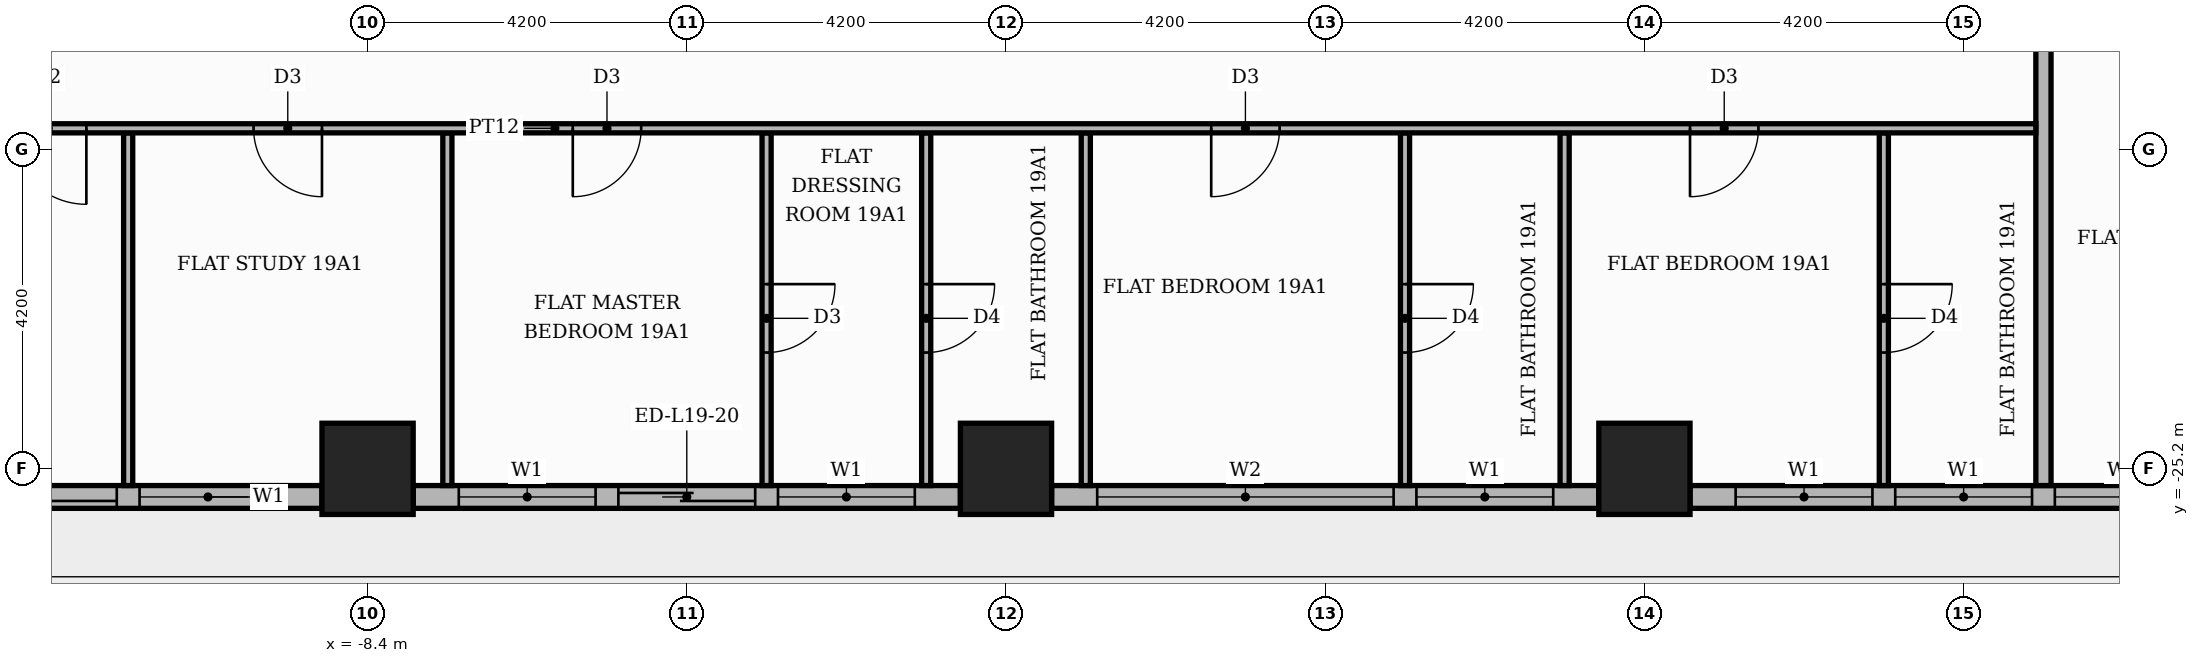
"""IFC4 building model, lengths in metres.
Left out: names, types, materials, properties, quantities, classifications, styles, units other than length and angle.
Written with IfcOpenShell. Run it as: python <this file> out.ifc"""

import sys

from ifc_helpers import new_model, si_unit, direction, frame, frame_2d, origin, origin_2d, place, context, subcontext, project, spatial, rectangle, extrude, element, fill, save


model = new_model("IFC4")
c1 = context("Model", 3, precision=1e-05, world=origin(), true_north=direction((0.0, 1.0)))
c2 = subcontext(c1, "Body", "Model", "MODEL_VIEW")
j1 = project(units=[si_unit("LENGTHUNIT", "METRE"), si_unit("PLANEANGLEUNIT", "RADIAN")], contexts=[c1])
p1 = place(None, origin())
s1 = spatial("IfcSite", under=j1, at=p1, CompositionType="ELEMENT")
p2 = place(p1, origin())
s2 = spatial("IfcBuilding", under=s1, at=p2, CompositionType="ELEMENT")
p3 = place(p2, frame((0.0, 0.0, 83.1)))
s3 = spatial("IfcBuildingStorey", under=s2, at=p3, CompositionType="ELEMENT", Elevation=83.1)
for number, where, z_axis, x_axis in (
    (1, (0.0, -25.2, 0.0), (0.0, 0.0, 1.0), (1.0, 0.0, 0.0)),
    (2, (8.4, -25.2, 0.0), (0.0, 0.0, 1.0), (1.0, 0.0, 0.0)),
    (3, (-8.4, -25.2, 0.0), (0.0, 0.0, 1.0), (1.0, 0.0, 0.0)),
):
    element("IfcColumn", number, at=place(p3, frame(where, z_axis=z_axis, x_axis=x_axis)), inside=s3, PredefinedType="COLUMN", context=c2, shape_type="SweptSolid", body=[
        extrude(rectangle(XDim=1.2, YDim=1.2, at=origin_2d()), origin(), (0.0, 0.0, 1.0), 3.9),
    ])
p4 = place(p3, frame((-16.2, -25.57, 0.0), z_axis=(0.0, 0.0, 1.0), x_axis=(1.0, 0.0, 0.0)))
e4 = element("IfcWall", 4, at=p4, inside=s3, PredefinedType="STANDARD", context=c2, shape_type="SweptSolid", body=[
    extrude(rectangle(XDim=7.2, YDim=0.3, at=frame_2d((3.6, 0.0))), origin(), (0.0, 0.0, 1.0), 3.48),
])
p5 = place(p4, frame((0.6, 0.0, 0.0)))
e5 = element("IfcOpeningElement", 5, at=p5, cuts=e4, PredefinedType="OPENING", context=c2, shape_type="SweptSolid", body=[
    extrude(rectangle(XDim=3.9, YDim=2.4, at=frame_2d((1.95, 1.2))), frame((0.0, 0.16, 0.0), z_axis=(0.0, -1.0, 0.0), x_axis=(1.0, 0.0, 0.0)), (0.0, 0.0, 1.0), 0.32),
])
p6 = place(p4, frame((4.8, 0.0, 0.9)))
e6 = element("IfcOpeningElement", 6, at=p6, cuts=e4, PredefinedType="OPENING", context=c2, shape_type="SweptSolid", body=[
    extrude(rectangle(XDim=1.8, YDim=2.1, at=frame_2d((0.9, 1.05))), frame((0.0, 0.16, 0.0), z_axis=(0.0, -1.0, 0.0), x_axis=(1.0, 0.0, 0.0)), (0.0, 0.0, 1.0), 0.32),
])
p7 = place(p3, frame((-7.8, -25.57, 0.0), z_axis=(0.0, 0.0, 1.0), x_axis=(1.0, 0.0, 0.0)))
e7 = element("IfcWall", 7, at=p7, inside=s3, PredefinedType="STANDARD", context=c2, shape_type="SweptSolid", body=[
    extrude(rectangle(XDim=7.2, YDim=0.3, at=frame_2d((3.6, 0.0))), origin(), (0.0, 0.0, 1.0), 3.48),
])
p8 = place(p7, frame((0.6, 0.0, 0.9)))
e8 = element("IfcOpeningElement", 8, at=p8, cuts=e7, PredefinedType="OPENING", context=c2, shape_type="SweptSolid", body=[
    extrude(rectangle(XDim=1.8, YDim=2.1, at=frame_2d((0.9, 1.05))), frame((0.0, 0.16, 0.0), z_axis=(0.0, -1.0, 0.0), x_axis=(1.0, 0.0, 0.0)), (0.0, 0.0, 1.0), 0.32),
])
p9 = place(p7, frame((2.7, 0.0, 0.0)))
e9 = element("IfcOpeningElement", 9, at=p9, cuts=e7, PredefinedType="OPENING", context=c2, shape_type="SweptSolid", body=[
    extrude(rectangle(XDim=1.8, YDim=2.4, at=frame_2d((0.9, 1.2))), frame((0.0, 0.16, 0.0), z_axis=(0.0, -1.0, 0.0), x_axis=(1.0, 0.0, 0.0)), (0.0, 0.0, 1.0), 0.32),
])
p10 = place(p7, frame((4.8, 0.0, 0.9)))
e10 = element("IfcOpeningElement", 10, at=p10, cuts=e7, PredefinedType="OPENING", context=c2, shape_type="SweptSolid", body=[
    extrude(rectangle(XDim=1.8, YDim=2.1, at=frame_2d((0.9, 1.05))), frame((0.0, 0.16, 0.0), z_axis=(0.0, -1.0, 0.0), x_axis=(1.0, 0.0, 0.0)), (0.0, 0.0, 1.0), 0.32),
])
p11 = place(p3, frame((0.6, -25.57, 0.0), z_axis=(0.0, 0.0, 1.0), x_axis=(1.0, 0.0, 0.0)))
e11 = element("IfcWall", 11, at=p11, inside=s3, PredefinedType="STANDARD", context=c2, shape_type="SweptSolid", body=[
    extrude(rectangle(XDim=7.2, YDim=0.3, at=frame_2d((3.6, 0.0))), origin(), (0.0, 0.0, 1.0), 3.48),
])
p12 = place(p11, frame((0.6, 0.0, 0.9)))
e12 = element("IfcOpeningElement", 12, at=p12, cuts=e11, PredefinedType="OPENING", context=c2, shape_type="SweptSolid", body=[
    extrude(rectangle(XDim=3.9, YDim=2.1, at=frame_2d((1.95, 1.05))), frame((0.0, 0.16, 0.0), z_axis=(0.0, -1.0, 0.0), x_axis=(1.0, 0.0, 0.0)), (0.0, 0.0, 1.0), 0.32),
])
p13 = place(p11, frame((4.8, 0.0, 0.9)))
e13 = element("IfcOpeningElement", 13, at=p13, cuts=e11, PredefinedType="OPENING", context=c2, shape_type="SweptSolid", body=[
    extrude(rectangle(XDim=1.8, YDim=2.1, at=frame_2d((0.9, 1.05))), frame((0.0, 0.16, 0.0), z_axis=(0.0, -1.0, 0.0), x_axis=(1.0, 0.0, 0.0)), (0.0, 0.0, 1.0), 0.32),
])
p14 = place(p3, frame((9.0, -25.57, 0.0), z_axis=(0.0, 0.0, 1.0), x_axis=(1.0, 0.0, 0.0)))
e14 = element("IfcWall", 14, at=p14, inside=s3, PredefinedType="STANDARD", context=c2, shape_type="SweptSolid", body=[
    extrude(rectangle(XDim=7.2, YDim=0.3, at=frame_2d((3.6, 0.0))), origin(), (0.0, 0.0, 1.0), 3.48),
])
p15 = place(p14, frame((0.6, 0.0, 0.9)))
e15 = element("IfcOpeningElement", 15, at=p15, cuts=e14, PredefinedType="OPENING", context=c2, shape_type="SweptSolid", body=[
    extrude(rectangle(XDim=1.8, YDim=2.1, at=frame_2d((0.9, 1.05))), frame((0.0, 0.16, 0.0), z_axis=(0.0, -1.0, 0.0), x_axis=(1.0, 0.0, 0.0)), (0.0, 0.0, 1.0), 0.32),
])
p16 = place(p14, frame((2.7, 0.0, 0.9)))
e16 = element("IfcOpeningElement", 16, at=p16, cuts=e14, PredefinedType="OPENING", context=c2, shape_type="SweptSolid", body=[
    extrude(rectangle(XDim=1.8, YDim=2.1, at=frame_2d((0.9, 1.05))), frame((0.0, 0.16, 0.0), z_axis=(0.0, -1.0, 0.0), x_axis=(1.0, 0.0, 0.0)), (0.0, 0.0, 1.0), 0.32),
])
p17 = place(p14, frame((4.8, 0.0, 0.9)))
e17 = element("IfcOpeningElement", 17, at=p17, cuts=e14, PredefinedType="OPENING", context=c2, shape_type="SweptSolid", body=[
    extrude(rectangle(XDim=1.8, YDim=2.1, at=frame_2d((0.9, 1.05))), frame((0.0, 0.16, 0.0), z_axis=(0.0, -1.0, 0.0), x_axis=(1.0, 0.0, 0.0)), (0.0, 0.0, 1.0), 0.32),
])
for number, where, z_axis, x_axis in (
    (18, (-11.55, -25.42, 0.0), (0.0, 0.0, 1.0), (0.0, 1.0, 0.0)),
    (19, (-7.35, -25.42, 0.0), (0.0, 0.0, 1.0), (0.0, 1.0, 0.0)),
):
    element("IfcWall", number, at=place(p3, frame(where, z_axis=z_axis, x_axis=x_axis)), inside=s3, PredefinedType="PARTITIONING", context=c2, shape_type="SweptSolid", body=[
        extrude(rectangle(XDim=4.64, YDim=0.12, at=frame_2d((2.32, 0.0))), origin(), (0.0, 0.0, 1.0), 3.48),
    ])
p18 = place(p3, frame((-3.15, -25.42, 0.0), z_axis=(0.0, 0.0, 1.0), x_axis=(0.0, 1.0, 0.0)))
e20 = element("IfcWall", 20, at=p18, inside=s3, PredefinedType="PARTITIONING", context=c2, shape_type="SweptSolid", body=[
    extrude(rectangle(XDim=4.64, YDim=0.12, at=frame_2d((2.32, 0.0))), origin(), (0.0, 0.0, 1.0), 3.48),
])
p19 = place(p18, frame((1.75, 0.0, 0.0)))
e21 = element("IfcOpeningElement", 21, at=p19, cuts=e20, PredefinedType="OPENING", context=c2, shape_type="SweptSolid", body=[
    extrude(rectangle(XDim=0.9, YDim=2.1, at=frame_2d((0.45, 1.05))), frame((0.0, 0.07, 0.0), z_axis=(0.0, -1.0, 0.0), x_axis=(1.0, 0.0, 0.0)), (0.0, 0.0, 1.0), 0.14),
])
p20 = place(p3, frame((-1.05, -25.42, 0.0), z_axis=(0.0, 0.0, 1.0), x_axis=(0.0, 1.0, 0.0)))
e22 = element("IfcWall", 22, at=p20, inside=s3, PredefinedType="PARTITIONING", context=c2, shape_type="SweptSolid", body=[
    extrude(rectangle(XDim=4.64, YDim=0.12, at=frame_2d((2.32, 0.0))), origin(), (0.0, 0.0, 1.0), 3.48),
])
p21 = place(p20, frame((1.75, 0.0, 0.0)))
e23 = element("IfcOpeningElement", 23, at=p21, cuts=e22, PredefinedType="OPENING", context=c2, shape_type="SweptSolid", body=[
    extrude(rectangle(XDim=0.9, YDim=2.1, at=frame_2d((0.45, 1.05))), frame((0.0, 0.07, 0.0), z_axis=(0.0, -1.0, 0.0), x_axis=(1.0, 0.0, 0.0)), (0.0, 0.0, 1.0), 0.14),
])
p22 = place(p3, frame((1.05, -25.42, 0.0), z_axis=(0.0, 0.0, 1.0), x_axis=(0.0, 1.0, 0.0)))
e24 = element("IfcWall", 24, at=p22, inside=s3, PredefinedType="PARTITIONING", context=c2, shape_type="SweptSolid", body=[
    extrude(rectangle(XDim=4.64, YDim=0.12, at=frame_2d((2.32, 0.0))), origin(), (0.0, 0.0, 1.0), 3.48),
])
p23 = place(p3, frame((5.25, -25.42, 0.0), z_axis=(0.0, 0.0, 1.0), x_axis=(0.0, 1.0, 0.0)))
e25 = element("IfcWall", 25, at=p23, inside=s3, PredefinedType="PARTITIONING", context=c2, shape_type="SweptSolid", body=[
    extrude(rectangle(XDim=4.64, YDim=0.12, at=frame_2d((2.32, 0.0))), origin(), (0.0, 0.0, 1.0), 3.48),
])
p24 = place(p23, frame((1.75, 0.0, 0.0)))
e26 = element("IfcOpeningElement", 26, at=p24, cuts=e25, PredefinedType="OPENING", context=c2, shape_type="SweptSolid", body=[
    extrude(rectangle(XDim=0.9, YDim=2.1, at=frame_2d((0.45, 1.05))), frame((0.0, 0.07, 0.0), z_axis=(0.0, -1.0, 0.0), x_axis=(1.0, 0.0, 0.0)), (0.0, 0.0, 1.0), 0.14),
])
p25 = place(p3, frame((7.35, -25.42, 0.0), z_axis=(0.0, 0.0, 1.0), x_axis=(0.0, 1.0, 0.0)))
e27 = element("IfcWall", 27, at=p25, inside=s3, PredefinedType="PARTITIONING", context=c2, shape_type="SweptSolid", body=[
    extrude(rectangle(XDim=4.64, YDim=0.12, at=frame_2d((2.32, 0.0))), origin(), (0.0, 0.0, 1.0), 3.48),
])
p26 = place(p3, frame((11.55, -25.42, 0.0), z_axis=(0.0, 0.0, 1.0), x_axis=(0.0, 1.0, 0.0)))
e28 = element("IfcWall", 28, at=p26, inside=s3, PredefinedType="PARTITIONING", context=c2, shape_type="SweptSolid", body=[
    extrude(rectangle(XDim=4.64, YDim=0.12, at=frame_2d((2.32, 0.0))), origin(), (0.0, 0.0, 1.0), 3.48),
])
p27 = place(p26, frame((1.75, 0.0, 0.0)))
e29 = element("IfcOpeningElement", 29, at=p27, cuts=e28, PredefinedType="OPENING", context=c2, shape_type="SweptSolid", body=[
    extrude(rectangle(XDim=0.9, YDim=2.1, at=frame_2d((0.45, 1.05))), frame((0.0, 0.07, 0.0), z_axis=(0.0, -1.0, 0.0), x_axis=(1.0, 0.0, 0.0)), (0.0, 0.0, 1.0), 0.14),
])
p28 = place(p3, frame((13.65, -25.42, 0.0), z_axis=(0.0, 0.0, 1.0), x_axis=(0.0, 1.0, 0.0)))
e30 = element("IfcWall", 30, at=p28, inside=s3, PredefinedType="PARTITIONING", context=c2, shape_type="SweptSolid", body=[
    extrude(rectangle(XDim=11.67, YDim=0.2, at=frame_2d((5.835, 0.0))), origin(), (0.0, 0.0, 1.0), 3.48),
])
p29 = place(p3, frame((-25.42, -20.72, 0.0), z_axis=(0.0, 0.0, 1.0), x_axis=(1.0, 0.0, 0.0)))
e31 = element("IfcWall", 31, at=p29, inside=s3, PredefinedType="PARTITIONING", context=c2, shape_type="SweptSolid", body=[
    extrude(rectangle(XDim=38.97, YDim=0.12, at=frame_2d((19.485, 0.0))), origin(), (0.0, 0.0, 1.0), 3.48),
])
p30 = place(p29, frame((12.32, 0.0, 0.0)))
e32 = element("IfcOpeningElement", 32, at=p30, cuts=e31, PredefinedType="OPENING", context=c2, shape_type="SweptSolid", body=[
    extrude(rectangle(XDim=1.0, YDim=2.1, at=frame_2d((0.5, 1.05))), frame((0.0, 0.07, 0.0), z_axis=(0.0, -1.0, 0.0), x_axis=(1.0, 0.0, 0.0)), (0.0, 0.0, 1.0), 0.14),
])
p31 = place(p29, frame((15.52, 0.0, 0.0)))
e33 = element("IfcOpeningElement", 33, at=p31, cuts=e31, PredefinedType="OPENING", context=c2, shape_type="SweptSolid", body=[
    extrude(rectangle(XDim=0.9, YDim=2.1, at=frame_2d((0.45, 1.05))), frame((0.0, 0.07, 0.0), z_axis=(0.0, -1.0, 0.0), x_axis=(1.0, 0.0, 0.0)), (0.0, 0.0, 1.0), 0.14),
])
p32 = place(p29, frame((19.72, 0.0, 0.0)))
e34 = element("IfcOpeningElement", 34, at=p32, cuts=e31, PredefinedType="OPENING", context=c2, shape_type="SweptSolid", body=[
    extrude(rectangle(XDim=0.9, YDim=2.1, at=frame_2d((0.45, 1.05))), frame((0.0, 0.07, 0.0), z_axis=(0.0, -1.0, 0.0), x_axis=(1.0, 0.0, 0.0)), (0.0, 0.0, 1.0), 0.14),
])
p33 = place(p29, frame((28.12, 0.0, 0.0)))
e35 = element("IfcOpeningElement", 35, at=p33, cuts=e31, PredefinedType="OPENING", context=c2, shape_type="SweptSolid", body=[
    extrude(rectangle(XDim=0.9, YDim=2.1, at=frame_2d((0.45, 1.05))), frame((0.0, 0.07, 0.0), z_axis=(0.0, -1.0, 0.0), x_axis=(1.0, 0.0, 0.0)), (0.0, 0.0, 1.0), 0.14),
])
p34 = place(p29, frame((34.42, 0.0, 0.0)))
e36 = element("IfcOpeningElement", 36, at=p34, cuts=e31, PredefinedType="OPENING", context=c2, shape_type="SweptSolid", body=[
    extrude(rectangle(XDim=0.9, YDim=2.1, at=frame_2d((0.45, 1.05))), frame((0.0, 0.07, 0.0), z_axis=(0.0, -1.0, 0.0), x_axis=(1.0, 0.0, 0.0)), (0.0, 0.0, 1.0), 0.14),
])
p35 = place(p5, origin())
e37 = element("IfcDoor", 37, at=p35, inside=s3, OperationType="SLIDING_TO_LEFT", PredefinedType="DOOR", context=c2, shape_type="SweptSolid", body=[
    extrude(rectangle(XDim=3.9, YDim=2.4, at=frame_2d((1.95, 1.2))), frame((0.0, 0.025, 0.0), z_axis=(0.0, -1.0, 0.0), x_axis=(1.0, 0.0, 0.0)), (0.0, 0.0, 1.0), 0.05),
])
fill(e5, e37)
p36 = place(p6, origin())
e38 = element("IfcWindow", 38, at=p36, inside=s3, PartitioningType="SINGLE_PANEL", PredefinedType="WINDOW", context=c2, shape_type="SweptSolid", body=[
    extrude(rectangle(XDim=1.8, YDim=2.1, at=frame_2d((0.9, 1.05))), frame((0.0, 0.03, 0.0), z_axis=(0.0, -1.0, 0.0), x_axis=(1.0, 0.0, 0.0)), (0.0, 0.0, 1.0), 0.06),
])
fill(e6, e38)
p37 = place(p8, origin())
e39 = element("IfcWindow", 39, at=p37, inside=s3, PartitioningType="SINGLE_PANEL", PredefinedType="WINDOW", context=c2, shape_type="SweptSolid", body=[
    extrude(rectangle(XDim=1.8, YDim=2.1, at=frame_2d((0.9, 1.05))), frame((0.0, 0.03, 0.0), z_axis=(0.0, -1.0, 0.0), x_axis=(1.0, 0.0, 0.0)), (0.0, 0.0, 1.0), 0.06),
])
fill(e8, e39)
p38 = place(p9, origin())
e40 = element("IfcDoor", 40, at=p38, inside=s3, OperationType="SLIDING_TO_LEFT", PredefinedType="DOOR", context=c2, shape_type="SweptSolid", body=[
    extrude(rectangle(XDim=1.8, YDim=2.4, at=frame_2d((0.9, 1.2))), frame((0.0, 0.025, 0.0), z_axis=(0.0, -1.0, 0.0), x_axis=(1.0, 0.0, 0.0)), (0.0, 0.0, 1.0), 0.05),
])
fill(e9, e40)
p39 = place(p10, origin())
e41 = element("IfcWindow", 41, at=p39, inside=s3, PartitioningType="SINGLE_PANEL", PredefinedType="WINDOW", context=c2, shape_type="SweptSolid", body=[
    extrude(rectangle(XDim=1.8, YDim=2.1, at=frame_2d((0.9, 1.05))), frame((0.0, 0.03, 0.0), z_axis=(0.0, -1.0, 0.0), x_axis=(1.0, 0.0, 0.0)), (0.0, 0.0, 1.0), 0.06),
])
fill(e10, e41)
p40 = place(p12, origin())
e42 = element("IfcWindow", 42, at=p40, inside=s3, PartitioningType="SINGLE_PANEL", PredefinedType="WINDOW", context=c2, shape_type="SweptSolid", body=[
    extrude(rectangle(XDim=3.9, YDim=2.1, at=frame_2d((1.95, 1.05))), frame((0.0, 0.03, 0.0), z_axis=(0.0, -1.0, 0.0), x_axis=(1.0, 0.0, 0.0)), (0.0, 0.0, 1.0), 0.06),
])
fill(e12, e42)
p41 = place(p13, origin())
e43 = element("IfcWindow", 43, at=p41, inside=s3, PartitioningType="SINGLE_PANEL", PredefinedType="WINDOW", context=c2, shape_type="SweptSolid", body=[
    extrude(rectangle(XDim=1.8, YDim=2.1, at=frame_2d((0.9, 1.05))), frame((0.0, 0.03, 0.0), z_axis=(0.0, -1.0, 0.0), x_axis=(1.0, 0.0, 0.0)), (0.0, 0.0, 1.0), 0.06),
])
fill(e13, e43)
p42 = place(p15, origin())
e44 = element("IfcWindow", 44, at=p42, inside=s3, PartitioningType="SINGLE_PANEL", PredefinedType="WINDOW", context=c2, shape_type="SweptSolid", body=[
    extrude(rectangle(XDim=1.8, YDim=2.1, at=frame_2d((0.9, 1.05))), frame((0.0, 0.03, 0.0), z_axis=(0.0, -1.0, 0.0), x_axis=(1.0, 0.0, 0.0)), (0.0, 0.0, 1.0), 0.06),
])
fill(e15, e44)
p43 = place(p16, origin())
e45 = element("IfcWindow", 45, at=p43, inside=s3, PartitioningType="SINGLE_PANEL", PredefinedType="WINDOW", context=c2, shape_type="SweptSolid", body=[
    extrude(rectangle(XDim=1.8, YDim=2.1, at=frame_2d((0.9, 1.05))), frame((0.0, 0.03, 0.0), z_axis=(0.0, -1.0, 0.0), x_axis=(1.0, 0.0, 0.0)), (0.0, 0.0, 1.0), 0.06),
])
fill(e16, e45)
p44 = place(p17, origin())
e46 = element("IfcWindow", 46, at=p44, inside=s3, PartitioningType="SINGLE_PANEL", PredefinedType="WINDOW", context=c2, shape_type="SweptSolid", body=[
    extrude(rectangle(XDim=1.8, YDim=2.1, at=frame_2d((0.9, 1.05))), frame((0.0, 0.03, 0.0), z_axis=(0.0, -1.0, 0.0), x_axis=(1.0, 0.0, 0.0)), (0.0, 0.0, 1.0), 0.06),
])
fill(e17, e46)
p45 = place(p30, frame((1.0, 0.0, 0.0), z_axis=(0.0, 0.0, 1.0), x_axis=(-1.0, 0.0, 0.0)))
e47 = element("IfcDoor", 47, at=p45, inside=s3, OperationType="SINGLE_SWING_RIGHT", PredefinedType="DOOR", context=c2, shape_type="SweptSolid", body=[
    extrude(rectangle(XDim=1.0, YDim=2.1, at=frame_2d((0.5, 1.05))), frame((0.0, 0.025, 0.0), z_axis=(0.0, -1.0, 0.0), x_axis=(1.0, 0.0, 0.0)), (0.0, 0.0, 1.0), 0.05),
])
fill(e32, e47)
p46 = place(p31, frame((0.9, 0.0, 0.0), z_axis=(0.0, 0.0, 1.0), x_axis=(-1.0, 0.0, 0.0)))
e48 = element("IfcDoor", 48, at=p46, inside=s3, OperationType="SINGLE_SWING_RIGHT", PredefinedType="DOOR", context=c2, shape_type="SweptSolid", body=[
    extrude(rectangle(XDim=0.9, YDim=2.1, at=frame_2d((0.45, 1.05))), frame((0.0, 0.025, 0.0), z_axis=(0.0, -1.0, 0.0), x_axis=(1.0, 0.0, 0.0)), (0.0, 0.0, 1.0), 0.05),
])
fill(e33, e48)
p47 = place(p32, frame((0.9, 0.0, 0.0), z_axis=(0.0, 0.0, 1.0), x_axis=(-1.0, 0.0, 0.0)))
e49 = element("IfcDoor", 49, at=p47, inside=s3, OperationType="SINGLE_SWING_LEFT", PredefinedType="DOOR", context=c2, shape_type="SweptSolid", body=[
    extrude(rectangle(XDim=0.9, YDim=2.1, at=frame_2d((0.45, 1.05))), frame((0.0, 0.025, 0.0), z_axis=(0.0, -1.0, 0.0), x_axis=(1.0, 0.0, 0.0)), (0.0, 0.0, 1.0), 0.05),
])
fill(e34, e49)
p48 = place(p19, frame((0.9, 0.0, 0.0), z_axis=(0.0, 0.0, 1.0), x_axis=(-1.0, 0.0, 0.0)))
e50 = element("IfcDoor", 50, at=p48, inside=s3, OperationType="SINGLE_SWING_RIGHT", PredefinedType="DOOR", context=c2, shape_type="SweptSolid", body=[
    extrude(rectangle(XDim=0.9, YDim=2.1, at=frame_2d((0.45, 1.05))), frame((0.0, 0.025, 0.0), z_axis=(0.0, -1.0, 0.0), x_axis=(1.0, 0.0, 0.0)), (0.0, 0.0, 1.0), 0.05),
])
fill(e21, e50)
p49 = place(p21, frame((0.9, 0.0, 0.0), z_axis=(0.0, 0.0, 1.0), x_axis=(-1.0, 0.0, 0.0)))
e51 = element("IfcDoor", 51, at=p49, inside=s3, OperationType="SINGLE_SWING_RIGHT", PredefinedType="DOOR", context=c2, shape_type="SweptSolid", body=[
    extrude(rectangle(XDim=0.9, YDim=2.1, at=frame_2d((0.45, 1.05))), frame((0.0, 0.025, 0.0), z_axis=(0.0, -1.0, 0.0), x_axis=(1.0, 0.0, 0.0)), (0.0, 0.0, 1.0), 0.05),
])
fill(e23, e51)
p50 = place(p33, frame((0.9, 0.0, 0.0), z_axis=(0.0, 0.0, 1.0), x_axis=(-1.0, 0.0, 0.0)))
e52 = element("IfcDoor", 52, at=p50, inside=s3, OperationType="SINGLE_SWING_LEFT", PredefinedType="DOOR", context=c2, shape_type="SweptSolid", body=[
    extrude(rectangle(XDim=0.9, YDim=2.1, at=frame_2d((0.45, 1.05))), frame((0.0, 0.025, 0.0), z_axis=(0.0, -1.0, 0.0), x_axis=(1.0, 0.0, 0.0)), (0.0, 0.0, 1.0), 0.05),
])
fill(e35, e52)
p51 = place(p24, frame((0.9, 0.0, 0.0), z_axis=(0.0, 0.0, 1.0), x_axis=(-1.0, 0.0, 0.0)))
e53 = element("IfcDoor", 53, at=p51, inside=s3, OperationType="SINGLE_SWING_RIGHT", PredefinedType="DOOR", context=c2, shape_type="SweptSolid", body=[
    extrude(rectangle(XDim=0.9, YDim=2.1, at=frame_2d((0.45, 1.05))), frame((0.0, 0.025, 0.0), z_axis=(0.0, -1.0, 0.0), x_axis=(1.0, 0.0, 0.0)), (0.0, 0.0, 1.0), 0.05),
])
fill(e26, e53)
p52 = place(p34, frame((0.9, 0.0, 0.0), z_axis=(0.0, 0.0, 1.0), x_axis=(-1.0, 0.0, 0.0)))
e54 = element("IfcDoor", 54, at=p52, inside=s3, OperationType="SINGLE_SWING_LEFT", PredefinedType="DOOR", context=c2, shape_type="SweptSolid", body=[
    extrude(rectangle(XDim=0.9, YDim=2.1, at=frame_2d((0.45, 1.05))), frame((0.0, 0.025, 0.0), z_axis=(0.0, -1.0, 0.0), x_axis=(1.0, 0.0, 0.0)), (0.0, 0.0, 1.0), 0.05),
])
fill(e36, e54)
p53 = place(p27, frame((0.9, 0.0, 0.0), z_axis=(0.0, 0.0, 1.0), x_axis=(-1.0, 0.0, 0.0)))
e55 = element("IfcDoor", 55, at=p53, inside=s3, OperationType="SINGLE_SWING_RIGHT", PredefinedType="DOOR", context=c2, shape_type="SweptSolid", body=[
    extrude(rectangle(XDim=0.9, YDim=2.1, at=frame_2d((0.45, 1.05))), frame((0.0, 0.025, 0.0), z_axis=(0.0, -1.0, 0.0), x_axis=(1.0, 0.0, 0.0)), (0.0, 0.0, 1.0), 0.05),
])
fill(e29, e55)
save(model, sys.argv[1])
